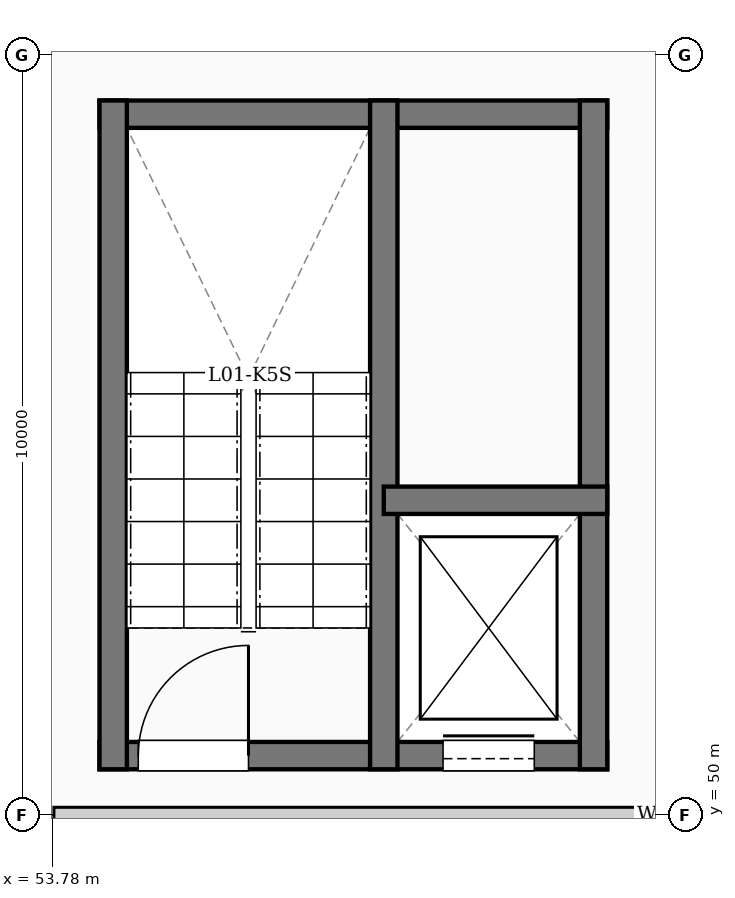
"""IFC4 building model, lengths in metres.
Left out: names, types, materials, properties, quantities, classifications, styles, units other than length and angle.
Written with IfcOpenShell. Run it as: python <this file> out.ifc"""

import sys

from ifc_helpers import new_model, si_unit, direction, frame, frame_2d, origin, place, context, subcontext, project, spatial, rectangle, extrude, element, fill, save


model = new_model("IFC4")
c1 = context("Model", 3, precision=1e-05, world=origin(), true_north=direction((0.0, 1.0)))
c2 = subcontext(c1, "Body", "Model", "MODEL_VIEW")
j1 = project(units=[si_unit("LENGTHUNIT", "METRE"), si_unit("PLANEANGLEUNIT", "RADIAN")], contexts=[c1])
p1 = place(None, origin())
s1 = spatial("IfcSite", under=j1, at=p1, CompositionType="ELEMENT")
p2 = place(p1, origin())
s2 = spatial("IfcBuilding", under=s1, at=p2, CompositionType="ELEMENT")
p3 = place(p2, frame((0.0, 0.0, 5.4)))
s3 = spatial("IfcBuildingStorey", under=s2, at=p3, CompositionType="ELEMENT", Elevation=5.4)
p4 = place(p3, frame((54.4, 50.78, 0.0), z_axis=(0.0, 0.0, 1.0), x_axis=(1.0, 0.0, 0.0)))
e1 = element("IfcWall", 1, at=p4, inside=s3, PredefinedType="SHEAR", context=c2, shape_type="SweptSolid", body=[
    extrude(rectangle(XDim=6.68, YDim=0.36, at=frame_2d((3.34, 0.0))), origin(), (0.0, 0.0, 1.0), 4.8),
])
p5 = place(p4, frame((0.51, 0.0, 0.0)))
e2 = element("IfcOpeningElement", 2, at=p5, cuts=e1, PredefinedType="OPENING", context=c2, shape_type="SweptSolid", body=[
    extrude(rectangle(XDim=1.45, YDim=2.4, at=frame_2d((0.725, 1.2))), frame((0.0, 0.19, 0.0), z_axis=(0.0, -1.0, 0.0), x_axis=(1.0, 0.0, 0.0)), (0.0, 0.0, 1.0), 0.38),
])
p6 = place(p4, frame((4.52, 0.0, 0.0)))
e3 = element("IfcOpeningElement", 3, at=p6, cuts=e1, PredefinedType="OPENING", context=c2, shape_type="SweptSolid", body=[
    extrude(rectangle(XDim=1.2, YDim=2.35, at=frame_2d((0.6, 1.175))), frame((0.0, 0.19, 0.0), z_axis=(0.0, -1.0, 0.0), x_axis=(1.0, 0.0, 0.0)), (0.0, 0.0, 1.0), 0.38),
])
p7 = place(p3, frame((54.4, 59.22, 0.0), z_axis=(0.0, 0.0, 1.0), x_axis=(1.0, 0.0, 0.0)))
e4 = element("IfcWall", 4, at=p7, inside=s3, PredefinedType="SHEAR", context=c2, shape_type="SweptSolid", body=[
    extrude(rectangle(XDim=6.68, YDim=0.36, at=frame_2d((3.34, 0.0))), origin(), (0.0, 0.0, 1.0), 4.8),
])
for number, where, z_axis, x_axis in (
    (5, (54.58, 50.6, 0.0), (0.0, 0.0, 1.0), (0.0, 1.0, 0.0)),
    (6, (60.9, 50.6, 0.0), (0.0, 0.0, 1.0), (0.0, 1.0, 0.0)),
    (7, (58.14, 50.6, 0.0), (0.0, 0.0, 1.0), (0.0, 1.0, 0.0)),
):
    element("IfcWall", number, at=place(p3, frame(where, z_axis=z_axis, x_axis=x_axis)), inside=s3, PredefinedType="SHEAR", context=c2, shape_type="SweptSolid", body=[
        extrude(rectangle(XDim=8.8, YDim=0.36, at=frame_2d((4.4, 0.0))), origin(), (0.0, 0.0, 1.0), 4.8),
    ])
p8 = place(p3, frame((58.14, 54.14, 0.0), z_axis=(0.0, 0.0, 1.0), x_axis=(1.0, 0.0, 0.0)))
e8 = element("IfcWall", 8, at=p8, inside=s3, PredefinedType="SHEAR", context=c2, shape_type="SweptSolid", body=[
    extrude(rectangle(XDim=2.94, YDim=0.36, at=frame_2d((1.47, 0.0))), origin(), (0.0, 0.0, 1.0), 4.8),
])
p9 = place(p3, frame((53.8, 50.0, 0.0), z_axis=(0.0, 0.0, 1.0), x_axis=(1.0, 0.0, 0.0)))
e9 = element("IfcWall", 9, at=p9, inside=s3, PredefinedType="PARTITIONING", context=c2, shape_type="SweptSolid", body=[
    extrude(rectangle(XDim=68.4, YDim=0.2, at=frame_2d((34.2, 0.0))), origin(), (0.0, 0.0, 1.0), 4.02),
])
p10 = place(p9, frame((14.332, 0.0, 0.0)))
e10 = element("IfcOpeningElement", 10, at=p10, cuts=e9, PredefinedType="OPENING", context=c2, shape_type="SweptSolid", body=[
    extrude(rectangle(XDim=2.8, YDim=2.7, at=frame_2d((1.4, 1.35))), frame((0.0, 0.11, 0.0), z_axis=(0.0, -1.0, 0.0), x_axis=(1.0, 0.0, 0.0)), (0.0, 0.0, 1.0), 0.22),
])
p11 = place(p9, frame((32.8, 0.0, 0.0)))
e11 = element("IfcOpeningElement", 11, at=p11, cuts=e9, PredefinedType="OPENING", context=c2, shape_type="SweptSolid", body=[
    extrude(rectangle(XDim=2.8, YDim=2.7, at=frame_2d((1.4, 1.35))), frame((0.0, 0.11, 0.0), z_axis=(0.0, -1.0, 0.0), x_axis=(1.0, 0.0, 0.0)), (0.0, 0.0, 1.0), 0.22),
])
p12 = place(p9, frame((51.268, 0.0, 0.0)))
e12 = element("IfcOpeningElement", 12, at=p12, cuts=e9, PredefinedType="OPENING", context=c2, shape_type="SweptSolid", body=[
    extrude(rectangle(XDim=2.8, YDim=2.7, at=frame_2d((1.4, 1.35))), frame((0.0, 0.11, 0.0), z_axis=(0.0, -1.0, 0.0), x_axis=(1.0, 0.0, 0.0)), (0.0, 0.0, 1.0), 0.22),
])
p13 = place(p5, origin())
e13 = element("IfcDoor", 13, at=p13, inside=s3, OperationType="SINGLE_SWING_RIGHT", PredefinedType="DOOR", context=c2, shape_type="SweptSolid", body=[
    extrude(rectangle(XDim=1.45, YDim=2.4, at=frame_2d((0.725, 1.2))), frame((0.0, 0.025, 0.0), z_axis=(0.0, -1.0, 0.0), x_axis=(1.0, 0.0, 0.0)), (0.0, 0.0, 1.0), 0.05),
])
fill(e2, e13)
p14 = place(p6, origin())
e14 = element("IfcDoor", 14, at=p14, inside=s3, OperationType="SLIDING_TO_LEFT", PredefinedType="DOOR", context=c2, shape_type="SweptSolid", body=[
    extrude(rectangle(XDim=1.2, YDim=2.35, at=frame_2d((0.6, 1.175))), frame((0.0, 0.025, 0.0), z_axis=(0.0, -1.0, 0.0), x_axis=(1.0, 0.0, 0.0)), (0.0, 0.0, 1.0), 0.05),
])
fill(e3, e14)
save(model, sys.argv[1])
